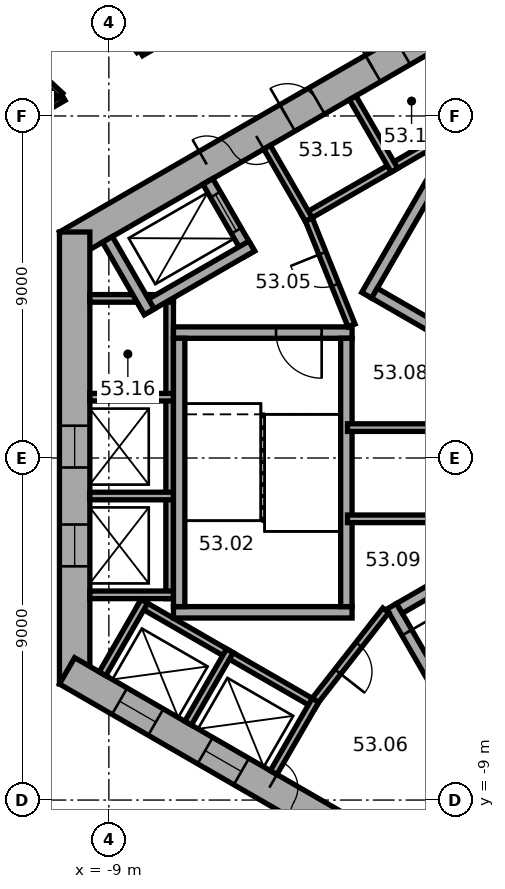
"""IFC4 building model, lengths in metres.
Left out: names, types, materials, properties, quantities, classifications, styles, units other than length and angle.
Written with IfcOpenShell. Run it as: python <this file> out.ifc"""

import sys

from ifc_helpers import new_model, si_unit, direction, frame, frame_2d, origin, place, context, subcontext, project, spatial, rectangle, extrude, element, fill, save


model = new_model("IFC4")
c1 = context("Model", 3, precision=1e-05, world=origin(), true_north=direction((0.0, 1.0)))
c2 = subcontext(c1, "Body", "Model", "MODEL_VIEW")
j1 = project(units=[si_unit("LENGTHUNIT", "METRE"), si_unit("PLANEANGLEUNIT", "RADIAN")], contexts=[c1])
p1 = place(None, origin())
s1 = spatial("IfcSite", under=j1, at=p1, CompositionType="ELEMENT")
p2 = place(p1, origin())
s2 = spatial("IfcBuilding", under=s1, at=p2, CompositionType="ELEMENT")
p3 = place(p2, frame((0.0, 0.0, 214.3)))
s3 = spatial("IfcBuildingStorey", under=s2, at=p3, CompositionType="ELEMENT", Elevation=214.3)
p4 = place(p3, frame((0.2, 11.547, 0.0), z_axis=(0.0, 0.0, 1.0), x_axis=(-0.866023897231, -0.500002609418, 0.0)))
e1 = element("IfcWall", 1, at=p4, inside=s3, PredefinedType="SHEAR", context=c2, shape_type="SweptSolid", body=[
    extrude(rectangle(XDim=11.894, YDim=0.8, at=frame_2d((5.947, 0.0))), origin(), (0.0, 0.0, 1.0), 7.4),
])
p5 = place(p4, frame((6.147, 0.0, 0.0)))
e2 = element("IfcOpeningElement", 2, at=p5, cuts=e1, PredefinedType="OPENING", context=c2, shape_type="SweptSolid", body=[
    extrude(rectangle(XDim=1.5, YDim=2.1, at=frame_2d((0.75, 1.05))), frame((0.0, 0.41, 0.0), z_axis=(0.0, -1.0, 0.0), x_axis=(1.0, 0.0, 0.0)), (0.0, 0.0, 1.0), 0.82),
])
p6 = place(p4, frame((1.697, 0.0, 0.0)))
e3 = element("IfcOpeningElement", 3, at=p6, cuts=e1, PredefinedType="OPENING", context=c2, shape_type="SweptSolid", body=[
    extrude(rectangle(XDim=0.9, YDim=2.1, at=frame_2d((0.45, 1.05))), frame((0.0, 0.41, 0.0), z_axis=(0.0, -1.0, 0.0), x_axis=(1.0, 0.0, 0.0)), (0.0, 0.0, 1.0), 0.82),
])
p7 = place(p4, frame((4.297, 0.0, 0.0)))
e4 = element("IfcOpeningElement", 4, at=p7, cuts=e1, PredefinedType="OPENING", context=c2, shape_type="SweptSolid", body=[
    extrude(rectangle(XDim=0.9, YDim=2.1, at=frame_2d((0.45, 1.05))), frame((0.0, 0.41, 0.0), z_axis=(0.0, -1.0, 0.0), x_axis=(1.0, 0.0, 0.0)), (0.0, 0.0, 1.0), 0.82),
])
p8 = place(p3, frame((-9.9, 5.947, 0.0), z_axis=(0.0, 0.0, 1.0), x_axis=(0.0, -1.0, 0.0)))
e5 = element("IfcWall", 5, at=p8, inside=s3, PredefinedType="SHEAR", context=c2, shape_type="SweptSolid", body=[
    extrude(rectangle(XDim=11.894, YDim=0.8, at=frame_2d((5.947, 0.0))), origin(), (0.0, 0.0, 1.0), 7.4),
])
p9 = place(p8, frame((5.097, 0.0, 0.0)))
e6 = element("IfcOpeningElement", 6, at=p9, cuts=e5, PredefinedType="OPENING", context=c2, shape_type="SweptSolid", body=[
    extrude(rectangle(XDim=1.1, YDim=2.1, at=frame_2d((0.55, 1.05))), frame((0.0, 0.41, 0.0), z_axis=(0.0, -1.0, 0.0), x_axis=(1.0, 0.0, 0.0)), (0.0, 0.0, 1.0), 0.82),
])
p10 = place(p8, frame((7.697, 0.0, 0.0)))
e7 = element("IfcOpeningElement", 7, at=p10, cuts=e5, PredefinedType="OPENING", context=c2, shape_type="SweptSolid", body=[
    extrude(rectangle(XDim=1.1, YDim=2.1, at=frame_2d((0.55, 1.05))), frame((0.0, 0.41, 0.0), z_axis=(0.0, -1.0, 0.0), x_axis=(1.0, 0.0, 0.0)), (0.0, 0.0, 1.0), 0.82),
])
p11 = place(p3, frame((-10.1, -5.6, 0.0), z_axis=(0.0, 0.0, 1.0), x_axis=(0.866023897231, -0.500002609418, 0.0)))
e8 = element("IfcWall", 8, at=p11, inside=s3, PredefinedType="SHEAR", context=c2, shape_type="SweptSolid", body=[
    extrude(rectangle(XDim=11.894, YDim=0.8, at=frame_2d((5.947, 0.0))), origin(), (0.0, 0.0, 1.0), 7.4),
])
p12 = place(p11, frame((6.147, 0.0, 0.0)))
e9 = element("IfcOpeningElement", 9, at=p12, cuts=e8, PredefinedType="OPENING", context=c2, shape_type="SweptSolid", body=[
    extrude(rectangle(XDim=1.5, YDim=2.1, at=frame_2d((0.75, 1.05))), frame((0.0, 0.41, 0.0), z_axis=(0.0, -1.0, 0.0), x_axis=(1.0, 0.0, 0.0)), (0.0, 0.0, 1.0), 0.82),
])
p13 = place(p11, frame((1.597, 0.0, 0.0)))
e10 = element("IfcOpeningElement", 10, at=p13, cuts=e8, PredefinedType="OPENING", context=c2, shape_type="SweptSolid", body=[
    extrude(rectangle(XDim=1.1, YDim=2.1, at=frame_2d((0.55, 1.05))), frame((0.0, 0.41, 0.0), z_axis=(0.0, -1.0, 0.0), x_axis=(1.0, 0.0, 0.0)), (0.0, 0.0, 1.0), 0.82),
])
p14 = place(p11, frame((4.197, 0.0, 0.0)))
e11 = element("IfcOpeningElement", 11, at=p14, cuts=e8, PredefinedType="OPENING", context=c2, shape_type="SweptSolid", body=[
    extrude(rectangle(XDim=1.1, YDim=2.1, at=frame_2d((0.55, 1.05))), frame((0.0, 0.41, 0.0), z_axis=(0.0, -1.0, 0.0), x_axis=(1.0, 0.0, 0.0)), (0.0, 0.0, 1.0), 0.82),
])
p15 = place(p3, frame((0.69, -16.171, 0.0), z_axis=(0.0, 0.0, 1.0), x_axis=(-0.871655280677, 0.490119446326, 0.0)))
e12 = element("IfcWall", 12, at=p15, inside=s3, PredefinedType="STANDARD", context=c2, shape_type="SweptSolid", body=[
    extrude(rectangle(XDim=14.552, YDim=0.15, at=frame_2d((7.276, 0.0))), origin(), (0.0, 0.0, 1.0), 2.6),
])
p16 = place(p15, frame((2.738, 0.0, 0.0)))
e13 = element("IfcOpeningElement", 13, at=p16, cuts=e12, PredefinedType="OPENING", context=c2, shape_type="SweptSolid", body=[
    extrude(rectangle(XDim=1.8, YDim=2.4, at=frame_2d((0.9, 1.2))), frame((0.0, 0.085, 0.0), z_axis=(0.0, -1.0, 0.0), x_axis=(1.0, 0.0, 0.0)), (0.0, 0.0, 1.0), 0.17),
])
p17 = place(p15, frame((10.014, 0.0, 0.0)))
e14 = element("IfcOpeningElement", 14, at=p17, cuts=e12, PredefinedType="OPENING", context=c2, shape_type="SweptSolid", body=[
    extrude(rectangle(XDim=1.8, YDim=2.4, at=frame_2d((0.9, 1.2))), frame((0.0, 0.085, 0.0), z_axis=(0.0, -1.0, 0.0), x_axis=(1.0, 0.0, 0.0)), (0.0, 0.0, 1.0), 0.17),
])
p18 = place(p3, frame((0.803, 9.009, 0.0), z_axis=(0.0, 0.0, 1.0), x_axis=(-0.866028230842, -0.499995103361, 0.0)))
e15 = element("IfcWall", 15, at=p18, inside=s3, PredefinedType="PARTITIONING", context=c2, shape_type="SweptSolid", body=[
    extrude(rectangle(XDim=5.4, YDim=0.2, at=frame_2d((2.7, 0.0))), origin(), (0.0, 0.0, 1.0), 7.12),
])
for number, where, z_axis, x_axis in (
    (16, (-1.485, 7.572, 0.0), (0.0, 0.0, 1.0), (-0.5, 0.866, 0.0)),
    (17, (-3.737, 6.272, 0.0), (0.0, 0.0, 1.0), (-0.5, 0.866, 0.0)),
):
    element("IfcWall", number, at=place(p3, frame(where, z_axis=z_axis, x_axis=x_axis)), inside=s3, PredefinedType="PARTITIONING", context=c2, shape_type="SweptSolid", body=[
        extrude(rectangle(XDim=2.2, YDim=0.2, at=frame_2d((1.1, 0.0))), origin(), (0.0, 0.0, 1.0), 7.12),
    ])
p19 = place(p3, frame((-7.4, 4.3, 0.0), z_axis=(0.0, 0.0, 1.0), x_axis=(0.0, -1.0, 0.0)))
e18 = element("IfcWall", 18, at=p19, inside=s3, PredefinedType="PARTITIONING", context=c2, shape_type="SweptSolid", body=[
    extrude(rectangle(XDim=8.0, YDim=0.2, at=frame_2d((4.0, 0.0))), origin(), (0.0, 0.0, 1.0), 7.12),
])
for number, where, z_axis, x_axis in (
    (19, (-7.3, 4.2, 0.0), (0.0, 0.0, 1.0), (-1.0, 0.0, 0.0)),
    (20, (-7.3, 1.6, 0.0), (0.0, 0.0, 1.0), (-1.0, 0.0, 0.0)),
    (21, (-7.3, -1.0, 0.0), (0.0, 0.0, 1.0), (-1.0, 0.0, 0.0)),
    (22, (-7.3, -3.6, 0.0), (0.0, 0.0, 1.0), (-1.0, 0.0, 0.0)),
):
    element("IfcWall", number, at=place(p3, frame(where, z_axis=z_axis, x_axis=x_axis)), inside=s3, PredefinedType="PARTITIONING", context=c2, shape_type="SweptSolid", body=[
        extrude(rectangle(XDim=2.2, YDim=0.2, at=frame_2d((1.1, 0.0))), origin(), (0.0, 0.0, 1.0), 7.12),
    ])
p20 = place(p3, frame((-8.203, -3.809, 0.0), z_axis=(0.0, 0.0, 1.0), x_axis=(0.866028230842, -0.499995103361, 0.0)))
e23 = element("IfcWall", 23, at=p20, inside=s3, PredefinedType="PARTITIONING", context=c2, shape_type="SweptSolid", body=[
    extrude(rectangle(XDim=5.4, YDim=0.2, at=frame_2d((2.7, 0.0))), origin(), (0.0, 0.0, 1.0), 7.12),
])
for number, where, z_axis, x_axis in (
    (24, (-8.067, -3.772, 0.0), (0.0, 0.0, 1.0), (-0.5, -0.866, 0.0)),
    (25, (-5.815, -5.072, 0.0), (0.0, 0.0, 1.0), (-0.5, -0.866, 0.0)),
):
    element("IfcWall", number, at=place(p3, frame(where, z_axis=z_axis, x_axis=x_axis)), inside=s3, PredefinedType="PARTITIONING", context=c2, shape_type="SweptSolid", body=[
        extrude(rectangle(XDim=2.2, YDim=0.2, at=frame_2d((1.1, 0.0))), origin(), (0.0, 0.0, 1.0), 7.12),
    ])
p21 = place(p3, frame((-3.563, -6.372, 0.0), z_axis=(0.0, 0.0, 1.0), x_axis=(-0.499994660107, -0.866028486751, 0.0)))
e26 = element("IfcWall", 26, at=p21, inside=s3, PredefinedType="PARTITIONING", context=c2, shape_type="SweptSolid", body=[
    extrude(rectangle(XDim=2.2, YDim=0.2, at=frame_2d((1.1, 0.0))), origin(), (0.0, 0.0, 1.0), 7.12),
])
p22 = place(p3, frame((-2.216, 4.282, 0.0), z_axis=(0.0, 0.0, 1.0), x_axis=(0.499977259774, 0.866038532462, 0.0)))
e27 = element("IfcWall", 27, at=p22, inside=s3, PredefinedType="SHEAR", context=c2, shape_type="SweptSolid", body=[
    extrude(rectangle(XDim=4.7, YDim=0.3, at=frame_2d((2.35, 0.0))), origin(), (0.0, 0.0, 1.0), 7.12),
])
p23 = place(p3, frame((4.103, 0.807, 0.0), z_axis=(0.0, 0.0, 1.0), x_axis=(-0.866027801685, 0.499995846692, 0.0)))
e28 = element("IfcWall", 28, at=p23, inside=s3, PredefinedType="SHEAR", context=c2, shape_type="SweptSolid", body=[
    extrude(rectangle(XDim=7.06, YDim=0.3, at=frame_2d((3.53, 0.0))), origin(), (0.0, 0.0, 1.0), 7.12),
])
p24 = place(p3, frame((-2.6, 3.3, 0.0), z_axis=(0.0, 0.0, 1.0), x_axis=(-1.0, 0.0, 0.0)))
e29 = element("IfcWall", 29, at=p24, inside=s3, PredefinedType="SHEAR", context=c2, shape_type="SweptSolid", body=[
    extrude(rectangle(XDim=4.7, YDim=0.3, at=frame_2d((2.35, 0.0))), origin(), (0.0, 0.0, 1.0), 7.12),
])
p25 = place(p24, frame((0.8, 0.0, 0.0)))
e30 = element("IfcOpeningElement", 30, at=p25, cuts=e29, PredefinedType="OPENING", context=c2, shape_type="SweptSolid", body=[
    extrude(rectangle(XDim=1.2, YDim=2.1, at=frame_2d((0.6, 1.05))), frame((0.0, 0.16, 0.0), z_axis=(0.0, -1.0, 0.0), x_axis=(1.0, 0.0, 0.0)), (0.0, 0.0, 1.0), 0.32),
])
p26 = place(p3, frame((-2.6, -4.06, 0.0), z_axis=(0.0, 0.0, 1.0), x_axis=(-1.0, 0.0, 0.0)))
e31 = element("IfcWall", 31, at=p26, inside=s3, PredefinedType="SHEAR", context=c2, shape_type="SweptSolid", body=[
    extrude(rectangle(XDim=4.7, YDim=0.3, at=frame_2d((2.35, 0.0))), origin(), (0.0, 0.0, 1.0), 7.12),
])
for number, where, z_axis, x_axis in (
    (32, (-2.75, 3.15, 0.0), (0.0, 0.0, 1.0), (0.0, -1.0, 0.0)),
    (33, (-7.15, 3.15, 0.0), (0.0, 0.0, 1.0), (0.0, -1.0, 0.0)),
):
    element("IfcWall", number, at=place(p3, frame(where, z_axis=z_axis, x_axis=x_axis)), inside=s3, PredefinedType="SHEAR", context=c2, shape_type="SweptSolid", body=[
        extrude(rectangle(XDim=7.06, YDim=0.3, at=frame_2d((3.53, 0.0))), origin(), (0.0, 0.0, 1.0), 7.12),
    ])
p27 = place(p3, frame((-1.558, -3.902, 0.0), z_axis=(0.0, 0.0, 1.0), x_axis=(0.499977259774, -0.866038532462, 0.0)))
e34 = element("IfcWall", 34, at=p27, inside=s3, PredefinedType="SHEAR", context=c2, shape_type="SweptSolid", body=[
    extrude(rectangle(XDim=4.7, YDim=0.3, at=frame_2d((2.35, 0.0))), origin(), (0.0, 0.0, 1.0), 7.12),
])
p28 = place(p27, frame((0.8, 0.0, 0.0)))
e35 = element("IfcOpeningElement", 35, at=p28, cuts=e34, PredefinedType="OPENING", context=c2, shape_type="SweptSolid", body=[
    extrude(rectangle(XDim=1.2, YDim=2.1, at=frame_2d((0.6, 1.05))), frame((0.0, 0.16, 0.0), z_axis=(0.0, -1.0, 0.0), x_axis=(1.0, 0.0, 0.0)), (0.0, 0.0, 1.0), 0.32),
])
p29 = place(p3, frame((-1.353, -3.957, 0.0), z_axis=(0.0, 0.0, 1.0), x_axis=(0.866027801685, 0.499995846692, 0.0)))
e36 = element("IfcWall", 36, at=p29, inside=s3, PredefinedType="SHEAR", context=c2, shape_type="SweptSolid", body=[
    extrude(rectangle(XDim=7.06, YDim=0.3, at=frame_2d((3.53, 0.0))), origin(), (0.0, 0.0, 1.0), 7.12),
])
p30 = place(p3, frame((-5.295, 5.372, 0.0), z_axis=(0.0, 0.0, 1.0), x_axis=(-0.500077893725, 0.86598042715, 0.0)))
e37 = element("IfcWall", 37, at=p30, inside=s3, PredefinedType="SHEAR", context=c2, shape_type="SweptSolid", body=[
    extrude(rectangle(XDim=2.2, YDim=0.3, at=frame_2d((1.1, 0.0))), origin(), (0.0, 0.0, 1.0), 7.12),
])
p31 = place(p30, frame((0.7, 0.0, 0.0)))
e38 = element("IfcOpeningElement", 38, at=p31, cuts=e37, PredefinedType="OPENING", context=c2, shape_type="SweptSolid", body=[
    extrude(rectangle(XDim=1.1, YDim=2.1, at=frame_2d((0.55, 1.05))), frame((0.0, 0.16, 0.0), z_axis=(0.0, -1.0, 0.0), x_axis=(1.0, 0.0, 0.0)), (0.0, 0.0, 1.0), 0.32),
])
p32 = place(p3, frame((-5.24, 5.577, 0.0), z_axis=(0.0, 0.0, 1.0), x_axis=(-0.866014461049, -0.500018952895, 0.0)))
e39 = element("IfcWall", 39, at=p32, inside=s3, PredefinedType="SHEAR", context=c2, shape_type="SweptSolid", body=[
    extrude(rectangle(XDim=3.35, YDim=0.3, at=frame_2d((1.675, 0.0))), origin(), (0.0, 0.0, 1.0), 7.12),
])
p33 = place(p3, frame((-7.937, 3.847, 0.0), z_axis=(0.0, 0.0, 1.0), x_axis=(-0.50002983664, 0.866008176907, 0.0)))
e40 = element("IfcWall", 40, at=p33, inside=s3, PredefinedType="SHEAR", context=c2, shape_type="SweptSolid", body=[
    extrude(rectangle(XDim=2.2, YDim=0.3, at=frame_2d((1.1, 0.0))), origin(), (0.0, 0.0, 1.0), 7.12),
])
p34 = place(p3, frame((-2.615, 3.487, 0.0), z_axis=(0.0, 0.0, 1.0), x_axis=(-0.373576831041, 0.92759924068, 0.0)))
e41 = element("IfcWall", 41, at=p34, inside=s3, PredefinedType="PARTITIONING", context=c2, shape_type="SweptSolid", body=[
    extrude(rectangle(XDim=3.002, YDim=0.2, at=frame_2d((1.501, 0.0))), origin(), (0.0, 0.0, 1.0), 7.12),
])
p35 = place(p34, frame((1.15, 0.0, 0.0)))
e42 = element("IfcOpeningElement", 42, at=p35, cuts=e41, PredefinedType="OPENING", context=c2, shape_type="SweptSolid", body=[
    extrude(rectangle(XDim=0.9, YDim=2.1, at=frame_2d((0.45, 1.05))), frame((0.0, 0.11, 0.0), z_axis=(0.0, -1.0, 0.0), x_axis=(1.0, 0.0, 0.0)), (0.0, 0.0, 1.0), 0.22),
])
p36 = place(p3, frame((-1.712, -4.008, 0.0), z_axis=(0.0, 0.0, 1.0), x_axis=(-0.616549420702, -0.787316208287, 0.0)))
e43 = element("IfcWall", 43, at=p36, inside=s3, PredefinedType="PARTITIONING", context=c2, shape_type="SweptSolid", body=[
    extrude(rectangle(XDim=3.002, YDim=0.2, at=frame_2d((1.501, 0.0))), origin(), (0.0, 0.0, 1.0), 7.12),
])
p37 = place(p36, frame((1.15, 0.0, 0.0)))
e44 = element("IfcOpeningElement", 44, at=p37, cuts=e43, PredefinedType="OPENING", context=c2, shape_type="SweptSolid", body=[
    extrude(rectangle(XDim=0.9, YDim=2.1, at=frame_2d((0.45, 1.05))), frame((0.0, 0.11, 0.0), z_axis=(0.0, -1.0, 0.0), x_axis=(1.0, 0.0, 0.0)), (0.0, 0.0, 1.0), 0.22),
])
p38 = place(p3, frame((-2.72, -1.6, 0.0), z_axis=(0.0, 0.0, 1.0), x_axis=(1.0, 0.0, 0.0)))
e45 = element("IfcWall", 45, at=p38, inside=s3, PredefinedType="PARTITIONING", context=c2, shape_type="SweptSolid", body=[
    extrude(rectangle(XDim=5.269, YDim=0.2, at=frame_2d((2.634, 0.0))), origin(), (0.0, 0.0, 1.0), 7.12),
])
p39 = place(p3, frame((-2.72, 0.8, 0.0), z_axis=(0.0, 0.0, 1.0), x_axis=(1.0, 0.0, 0.0)))
e46 = element("IfcWall", 46, at=p39, inside=s3, PredefinedType="PARTITIONING", context=c2, shape_type="SweptSolid", body=[
    extrude(rectangle(XDim=6.654, YDim=0.2, at=frame_2d((3.327, 0.0))), origin(), (0.0, 0.0, 1.0), 7.12),
])
p40 = place(p3, frame((-11.915, 8.479, 0.0), z_axis=(0.0, 0.0, 1.0), x_axis=(0.866108031567, 0.499856857165, 0.0)))
e47 = element("IfcWall", 47, at=p40, inside=s3, PredefinedType="PARTITIONING", context=c2, shape_type="SweptSolid", body=[
    extrude(rectangle(XDim=1.992, YDim=0.15, at=frame_2d((0.996, 0.0))), origin(), (0.0, 0.0, 1.0), 7.12),
])
p41 = place(p40, frame((0.25, 0.0, 0.0)))
e48 = element("IfcOpeningElement", 48, at=p41, cuts=e47, PredefinedType="OPENING", context=c2, shape_type="SweptSolid", body=[
    extrude(rectangle(XDim=1.0, YDim=2.1, at=frame_2d((0.5, 1.05))), frame((0.0, 0.085, 0.0), z_axis=(0.0, -1.0, 0.0), x_axis=(1.0, 0.0, 0.0)), (0.0, 0.0, 1.0), 0.17),
])
p42 = place(p3, frame((-8.199, 10.716, 0.0), z_axis=(0.0, 0.0, 1.0), x_axis=(-0.607666232271, 0.794192514544, 0.0)))
e49 = element("IfcWall", 49, at=p42, inside=s3, PredefinedType="PARTITIONING", context=c2, shape_type="SweptSolid", body=[
    extrude(rectangle(XDim=5.366, YDim=0.15, at=frame_2d((2.683, 0.0))), origin(), (0.0, 0.0, 1.0), 7.12),
])
p43 = place(p3, frame((-14.404, 13.392, 0.0), z_axis=(0.0, 0.0, 1.0), x_axis=(0.73235196953, -0.680926275543, 0.0)))
e50 = element("IfcWall", 50, at=p43, inside=s3, PredefinedType="PARTITIONING", context=c2, shape_type="SweptSolid", body=[
    extrude(rectangle(XDim=5.654, YDim=0.15, at=frame_2d((2.827, 0.0))), origin(), (0.0, 0.0, 1.0), 6.57),
])
p44 = place(p3, frame((-2.03, 14.186, 0.0), z_axis=(0.0, 0.0, 1.0), x_axis=(-0.866034287694, -0.499984612302, 0.0)))
e51 = element("IfcWall", 51, at=p44, inside=s3, PredefinedType="PARTITIONING", context=c2, shape_type="SweptSolid", body=[
    extrude(rectangle(XDim=7.067, YDim=0.15, at=frame_2d((3.534, 0.0))), origin(), (0.0, 0.0, 1.0), 7.12),
])
p45 = place(p44, frame((0.55, 0.0, 0.0)))
e52 = element("IfcOpeningElement", 52, at=p45, cuts=e51, PredefinedType="OPENING", context=c2, shape_type="SweptSolid", body=[
    extrude(rectangle(XDim=1.4, YDim=2.4, at=frame_2d((0.7, 1.2))), frame((0.0, 0.085, 0.0), z_axis=(0.0, -1.0, 0.0), x_axis=(1.0, 0.0, 0.0)), (0.0, 0.0, 1.0), 0.17),
])
p46 = place(p5, origin())
e53 = element("IfcDoor", 53, at=p46, inside=s3, OperationType="DOUBLE_DOOR_SINGLE_SWING", PredefinedType="DOOR", context=c2, shape_type="SweptSolid", body=[
    extrude(rectangle(XDim=1.5, YDim=2.1, at=frame_2d((0.75, 1.05))), frame((0.0, 0.025, 0.0), z_axis=(0.0, -1.0, 0.0), x_axis=(1.0, 0.0, 0.0)), (0.0, 0.0, 1.0), 0.05),
])
fill(e2, e53)
p47 = place(p12, origin())
e54 = element("IfcDoor", 54, at=p47, inside=s3, OperationType="DOUBLE_DOOR_SINGLE_SWING", PredefinedType="DOOR", context=c2, shape_type="SweptSolid", body=[
    extrude(rectangle(XDim=1.5, YDim=2.1, at=frame_2d((0.75, 1.05))), frame((0.0, 0.025, 0.0), z_axis=(0.0, -1.0, 0.0), x_axis=(1.0, 0.0, 0.0)), (0.0, 0.0, 1.0), 0.05),
])
fill(e9, e54)
p48 = place(p25, origin())
e55 = element("IfcDoor", 55, at=p48, inside=s3, OperationType="SINGLE_SWING_RIGHT", PredefinedType="DOOR", context=c2, shape_type="SweptSolid", body=[
    extrude(rectangle(XDim=1.2, YDim=2.1, at=frame_2d((0.6, 1.05))), frame((0.0, 0.025, 0.0), z_axis=(0.0, -1.0, 0.0), x_axis=(1.0, 0.0, 0.0)), (0.0, 0.0, 1.0), 0.05),
])
fill(e30, e55)
p49 = place(p28, origin())
e56 = element("IfcDoor", 56, at=p49, inside=s3, OperationType="SINGLE_SWING_RIGHT", PredefinedType="DOOR", context=c2, shape_type="SweptSolid", body=[
    extrude(rectangle(XDim=1.2, YDim=2.1, at=frame_2d((0.6, 1.05))), frame((0.0, 0.025, 0.0), z_axis=(0.0, -1.0, 0.0), x_axis=(1.0, 0.0, 0.0)), (0.0, 0.0, 1.0), 0.05),
])
fill(e35, e56)
p50 = place(p35, origin())
e57 = element("IfcDoor", 57, at=p50, inside=s3, OperationType="SINGLE_SWING_LEFT", PredefinedType="DOOR", context=c2, shape_type="SweptSolid", body=[
    extrude(rectangle(XDim=0.9, YDim=2.1, at=frame_2d((0.45, 1.05))), frame((0.0, 0.025, 0.0), z_axis=(0.0, -1.0, 0.0), x_axis=(1.0, 0.0, 0.0)), (0.0, 0.0, 1.0), 0.05),
])
fill(e42, e57)
p51 = place(p37, origin())
e58 = element("IfcDoor", 58, at=p51, inside=s3, OperationType="SINGLE_SWING_LEFT", PredefinedType="DOOR", context=c2, shape_type="SweptSolid", body=[
    extrude(rectangle(XDim=0.9, YDim=2.1, at=frame_2d((0.45, 1.05))), frame((0.0, 0.025, 0.0), z_axis=(0.0, -1.0, 0.0), x_axis=(1.0, 0.0, 0.0)), (0.0, 0.0, 1.0), 0.05),
])
fill(e44, e58)
p52 = place(p6, origin())
e59 = element("IfcDoor", 59, at=p52, inside=s3, OperationType="SINGLE_SWING_LEFT", PredefinedType="DOOR", context=c2, shape_type="SweptSolid", body=[
    extrude(rectangle(XDim=0.9, YDim=2.1, at=frame_2d((0.45, 1.05))), frame((0.0, 0.025, 0.0), z_axis=(0.0, -1.0, 0.0), x_axis=(1.0, 0.0, 0.0)), (0.0, 0.0, 1.0), 0.05),
])
fill(e3, e59)
p53 = place(p7, origin())
e60 = element("IfcDoor", 60, at=p53, inside=s3, OperationType="SINGLE_SWING_LEFT", PredefinedType="DOOR", context=c2, shape_type="SweptSolid", body=[
    extrude(rectangle(XDim=0.9, YDim=2.1, at=frame_2d((0.45, 1.05))), frame((0.0, 0.025, 0.0), z_axis=(0.0, -1.0, 0.0), x_axis=(1.0, 0.0, 0.0)), (0.0, 0.0, 1.0), 0.05),
])
fill(e4, e60)
p54 = place(p31, origin())
e61 = element("IfcDoor", 61, at=p54, inside=s3, OperationType="DOUBLE_DOOR_SLIDING", PredefinedType="DOOR", context=c2, shape_type="SweptSolid", body=[
    extrude(rectangle(XDim=1.1, YDim=2.1, at=frame_2d((0.55, 1.05))), frame((0.0, 0.025, 0.0), z_axis=(0.0, -1.0, 0.0), x_axis=(1.0, 0.0, 0.0)), (0.0, 0.0, 1.0), 0.05),
])
fill(e38, e61)
p55 = place(p9, origin())
e62 = element("IfcDoor", 62, at=p55, inside=s3, OperationType="DOUBLE_DOOR_SLIDING", PredefinedType="DOOR", context=c2, shape_type="SweptSolid", body=[
    extrude(rectangle(XDim=1.1, YDim=2.1, at=frame_2d((0.55, 1.05))), frame((0.0, 0.025, 0.0), z_axis=(0.0, -1.0, 0.0), x_axis=(1.0, 0.0, 0.0)), (0.0, 0.0, 1.0), 0.05),
])
fill(e6, e62)
p56 = place(p10, origin())
e63 = element("IfcDoor", 63, at=p56, inside=s3, OperationType="DOUBLE_DOOR_SLIDING", PredefinedType="DOOR", context=c2, shape_type="SweptSolid", body=[
    extrude(rectangle(XDim=1.1, YDim=2.1, at=frame_2d((0.55, 1.05))), frame((0.0, 0.025, 0.0), z_axis=(0.0, -1.0, 0.0), x_axis=(1.0, 0.0, 0.0)), (0.0, 0.0, 1.0), 0.05),
])
fill(e7, e63)
p57 = place(p13, origin())
e64 = element("IfcDoor", 64, at=p57, inside=s3, OperationType="DOUBLE_DOOR_SLIDING", PredefinedType="DOOR", context=c2, shape_type="SweptSolid", body=[
    extrude(rectangle(XDim=1.1, YDim=2.1, at=frame_2d((0.55, 1.05))), frame((0.0, 0.025, 0.0), z_axis=(0.0, -1.0, 0.0), x_axis=(1.0, 0.0, 0.0)), (0.0, 0.0, 1.0), 0.05),
])
fill(e10, e64)
p58 = place(p14, origin())
e65 = element("IfcDoor", 65, at=p58, inside=s3, OperationType="DOUBLE_DOOR_SLIDING", PredefinedType="DOOR", context=c2, shape_type="SweptSolid", body=[
    extrude(rectangle(XDim=1.1, YDim=2.1, at=frame_2d((0.55, 1.05))), frame((0.0, 0.025, 0.0), z_axis=(0.0, -1.0, 0.0), x_axis=(1.0, 0.0, 0.0)), (0.0, 0.0, 1.0), 0.05),
])
fill(e11, e65)
save(model, sys.argv[1])
